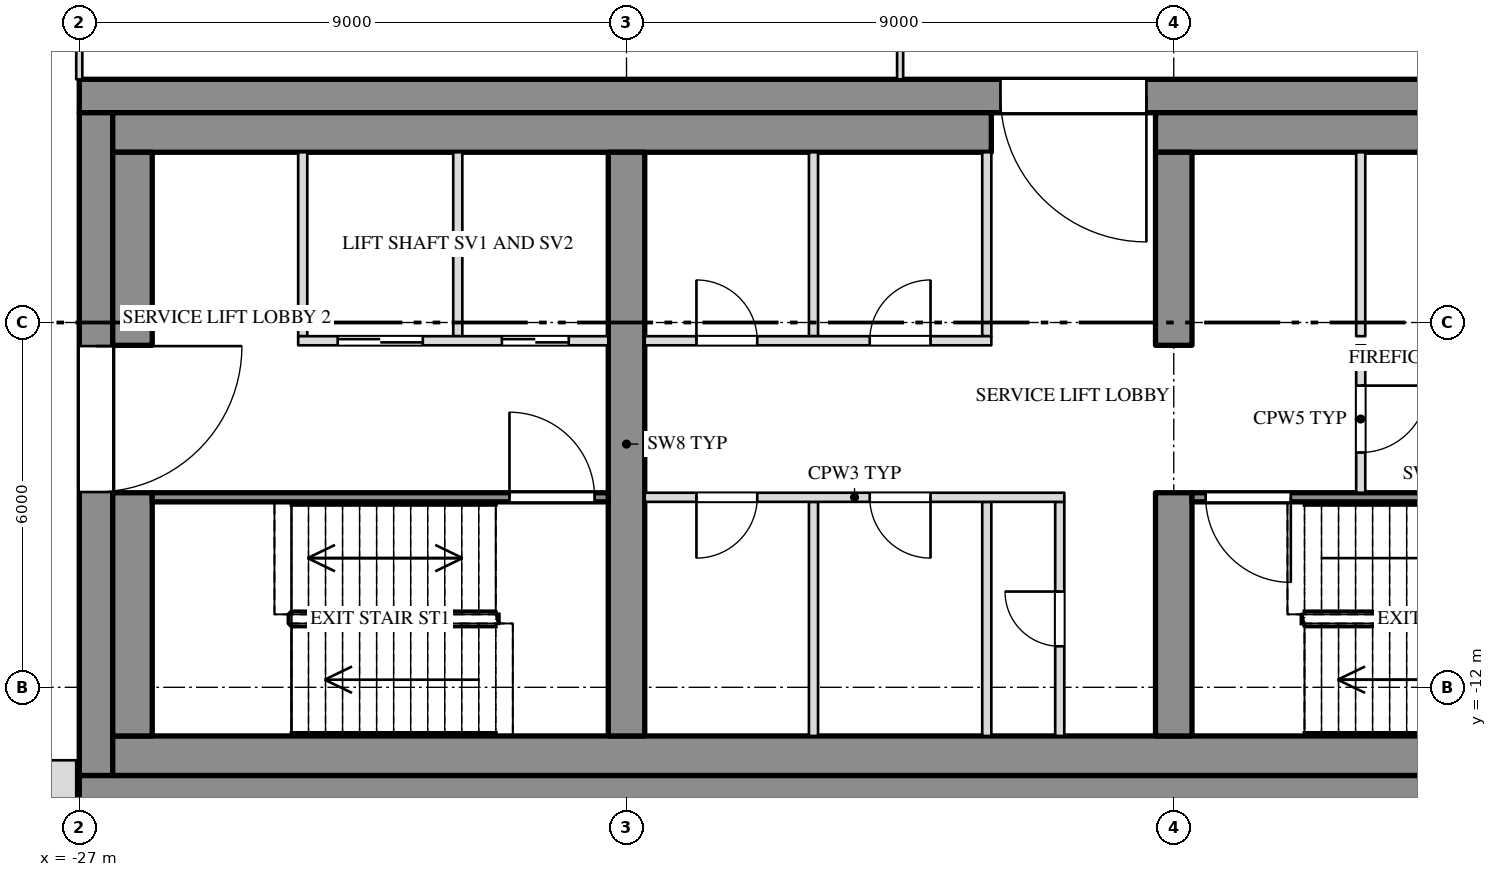
"""IFC4 building model, lengths in metres.
Left out: names, types, materials, properties, quantities, classifications, styles, units other than length and angle.
Written with IfcOpenShell. Run it as: python <this file> out.ifc"""

import sys

from ifc_helpers import new_model, si_unit, direction, frame, frame_2d, origin, place, context, subcontext, project, spatial, rectangle, extrude, element, fill, save


model = new_model("IFC4")
c1 = context("Model", 3, precision=1e-05, world=origin(), true_north=direction((0.0, 1.0)))
c2 = subcontext(c1, "Body", "Model", "MODEL_VIEW")
j1 = project(units=[si_unit("LENGTHUNIT", "METRE"), si_unit("PLANEANGLEUNIT", "RADIAN")], contexts=[c1])
p1 = place(None, origin())
s1 = spatial("IfcSite", under=j1, at=p1, CompositionType="ELEMENT")
p2 = place(p1, origin())
s2 = spatial("IfcBuilding", under=s1, at=p2, CompositionType="ELEMENT")
p3 = place(p2, frame((0.0, 0.0, 272.5)))
s3 = spatial("IfcBuildingStorey", under=s2, at=p3, CompositionType="ELEMENT", Elevation=272.5)
p4 = place(p3, frame((-27.0, -2.275, 0.0), z_axis=(0.0, 0.0, 1.0), x_axis=(1.0, 0.0, 0.0)))
e1 = element("IfcWall", 1, at=p4, inside=s3, PredefinedType="SHEAR", context=c2, shape_type="SweptSolid", body=[
    extrude(rectangle(XDim=54.0, YDim=0.55, at=frame_2d((27.0, 0.0))), origin(), (0.0, 0.0, 1.0), 3.78),
])
p5 = place(p4, frame((15.15, 0.0, 0.0)))
e2 = element("IfcOpeningElement", 2, at=p5, cuts=e1, PredefinedType="OPENING", context=c2, shape_type="SweptSolid", body=[
    extrude(rectangle(XDim=2.4, YDim=2.1, at=frame_2d((1.2, 1.05))), frame((0.0, 0.287, 0.0), z_axis=(0.0, -1.0, 0.0), x_axis=(1.0, 0.0, 0.0)), (0.0, 0.0, 1.0), 0.574),
])
p6 = place(p4, frame((36.45, 0.0, 0.0)))
e3 = element("IfcOpeningElement", 3, at=p6, cuts=e1, PredefinedType="OPENING", context=c2, shape_type="SweptSolid", body=[
    extrude(rectangle(XDim=2.4, YDim=2.1, at=frame_2d((1.2, 1.05))), frame((0.0, 0.287, 0.0), z_axis=(0.0, -1.0, 0.0), x_axis=(1.0, 0.0, 0.0)), (0.0, 0.0, 1.0), 0.574),
])
p7 = place(p3, frame((-27.0, -13.725, 0.0), z_axis=(0.0, 0.0, 1.0), x_axis=(1.0, 0.0, 0.0)))
e4 = element("IfcWall", 4, at=p7, inside=s3, PredefinedType="SHEAR", context=c2, shape_type="SweptSolid", body=[
    extrude(rectangle(XDim=54.0, YDim=0.55, at=frame_2d((27.0, 0.0))), origin(), (0.0, 0.0, 1.0), 3.78),
])
p8 = place(p3, frame((-26.725, -13.45, 0.0), z_axis=(0.0, 0.0, 1.0), x_axis=(0.0, 1.0, 0.0)))
e5 = element("IfcWall", 5, at=p8, inside=s3, PredefinedType="SHEAR", context=c2, shape_type="SweptSolid", body=[
    extrude(rectangle(XDim=10.9, YDim=0.55, at=frame_2d((5.45, 0.0))), origin(), (0.0, 0.0, 1.0), 3.78),
])
p9 = place(p8, frame((4.662, 0.0, 0.0)))
e6 = element("IfcOpeningElement", 6, at=p9, cuts=e5, PredefinedType="OPENING", context=c2, shape_type="SweptSolid", body=[
    extrude(rectangle(XDim=2.4, YDim=2.1, at=frame_2d((1.2, 1.05))), frame((0.0, 0.287, 0.0), z_axis=(0.0, -1.0, 0.0), x_axis=(1.0, 0.0, 0.0)), (0.0, 0.0, 1.0), 0.574),
])
p10 = place(p3, frame((-26.45, -2.875, 0.0), z_axis=(0.0, 0.0, 1.0), x_axis=(1.0, 0.0, 0.0)))
e7 = element("IfcWall", 7, at=p10, inside=s3, PredefinedType="SHEAR", context=c2, shape_type="SweptSolid", body=[
    extrude(rectangle(XDim=14.45, YDim=0.65, at=frame_2d((7.225, 0.0))), origin(), (0.0, 0.0, 1.0), 3.78),
])
p11 = place(p3, frame((-9.3, -2.875, 0.0), z_axis=(0.0, 0.0, 1.0), x_axis=(1.0, 0.0, 0.0)))
e8 = element("IfcWall", 8, at=p11, inside=s3, PredefinedType="SHEAR", context=c2, shape_type="SweptSolid", body=[
    extrude(rectangle(XDim=18.6, YDim=0.65, at=frame_2d((9.3, 0.0))), origin(), (0.0, 0.0, 1.0), 3.78),
])
p12 = place(p3, frame((-26.45, -13.125, 0.0), z_axis=(0.0, 0.0, 1.0), x_axis=(1.0, 0.0, 0.0)))
e9 = element("IfcWall", 9, at=p12, inside=s3, PredefinedType="SHEAR", context=c2, shape_type="SweptSolid", body=[
    extrude(rectangle(XDim=52.9, YDim=0.65, at=frame_2d((26.45, 0.0))), origin(), (0.0, 0.0, 1.0), 3.78),
])
p13 = place(p3, frame((-26.125, -12.8, 0.0), z_axis=(0.0, 0.0, 1.0), x_axis=(0.0, 1.0, 0.0)))
e10 = element("IfcWall", 10, at=p13, inside=s3, PredefinedType="SHEAR", context=c2, shape_type="SweptSolid", body=[
    extrude(rectangle(XDim=4.0, YDim=0.65, at=frame_2d((2.0, 0.0))), origin(), (0.0, 0.0, 1.0), 3.78),
])
p14 = place(p3, frame((-26.125, -6.375, 0.0), z_axis=(0.0, 0.0, 1.0), x_axis=(0.0, 1.0, 0.0)))
e11 = element("IfcWall", 11, at=p14, inside=s3, PredefinedType="SHEAR", context=c2, shape_type="SweptSolid", body=[
    extrude(rectangle(XDim=3.175, YDim=0.65, at=frame_2d((1.587, 0.0))), origin(), (0.0, 0.0, 1.0), 3.78),
])
p15 = place(p3, frame((-18.0, -12.8, 0.0), z_axis=(0.0, 0.0, 1.0), x_axis=(0.0, 1.0, 0.0)))
e12 = element("IfcWall", 12, at=p15, inside=s3, PredefinedType="SHEAR", context=c2, shape_type="SweptSolid", body=[
    extrude(rectangle(XDim=9.6, YDim=0.6, at=frame_2d((4.8, 0.0))), origin(), (0.0, 0.0, 1.0), 3.78),
])
p16 = place(p3, frame((-9.0, -12.8, 0.0), z_axis=(0.0, 0.0, 1.0), x_axis=(0.0, 1.0, 0.0)))
e13 = element("IfcWall", 13, at=p16, inside=s3, PredefinedType="SHEAR", context=c2, shape_type="SweptSolid", body=[
    extrude(rectangle(XDim=4.0, YDim=0.6, at=frame_2d((2.0, 0.0))), origin(), (0.0, 0.0, 1.0), 3.78),
])
p17 = place(p3, frame((-9.0, -6.375, 0.0), z_axis=(0.0, 0.0, 1.0), x_axis=(0.0, 1.0, 0.0)))
e14 = element("IfcWall", 14, at=p17, inside=s3, PredefinedType="SHEAR", context=c2, shape_type="SweptSolid", body=[
    extrude(rectangle(XDim=3.175, YDim=0.6, at=frame_2d((1.587, 0.0))), origin(), (0.0, 0.0, 1.0), 3.78),
])
p18 = place(p3, frame((-27.0, -2.0, 0.0), z_axis=(0.0, 0.0, 1.0), x_axis=(0.0, 1.0, 0.0)))
e15 = element("IfcWall", 15, at=p18, inside=s3, PredefinedType="PARTITIONING", context=c2, shape_type="SweptSolid", body=[
    extrude(rectangle(XDim=6.313, YDim=0.1, at=frame_2d((3.157, 0.0))), origin(), (0.0, 0.0, 1.0), 3.247),
])
p19 = place(p3, frame((-13.5, -2.0, 0.0), z_axis=(0.0, 0.0, 1.0), x_axis=(0.0, 1.0, 0.0)))
e16 = element("IfcWall", 16, at=p19, inside=s3, PredefinedType="PARTITIONING", context=c2, shape_type="SweptSolid", body=[
    extrude(rectangle(XDim=8.58, YDim=0.1, at=frame_2d((4.29, 0.0))), origin(), (0.0, 0.0, 1.0), 3.247),
])
p20 = place(p3, frame((-29.948, -13.6, 0.0), z_axis=(0.0, 0.0, 1.0), x_axis=(1.0, 0.0, 0.0)))
e17 = element("IfcWall", 17, at=p20, inside=s3, PredefinedType="SOLIDWALL", context=c2, shape_type="SweptSolid", body=[
    extrude(rectangle(XDim=2.897, YDim=0.8, at=frame_2d((1.449, 0.0))), origin(), (0.0, 0.0, 1.0), 3.78),
])
for number, where, z_axis, x_axis in (
    (18, (-20.775, -6.225, 0.0), (0.0, 0.0, 1.0), (0.0, 1.0, 0.0)),
    (19, (-23.325, -6.225, 0.0), (0.0, 0.0, 1.0), (0.0, 1.0, 0.0)),
    (20, (-12.075, -6.225, 0.0), (0.0, 0.0, 1.0), (0.0, 1.0, 0.0)),
    (21, (-14.925, -6.225, 0.0), (0.0, 0.0, 1.0), (0.0, 1.0, 0.0)),
    (22, (-5.925, -6.225, 0.0), (0.0, 0.0, 1.0), (0.0, 1.0, 0.0)),
):
    element("IfcWall", number, at=place(p3, frame(where, z_axis=z_axis, x_axis=x_axis)), inside=s3, PredefinedType="PARTITIONING", context=c2, shape_type="SweptSolid", body=[
        extrude(rectangle(XDim=3.025, YDim=0.15, at=frame_2d((1.513, 0.0))), origin(), (0.0, 0.0, 1.0), 3.78),
    ])
p21 = place(p3, frame((-10.875, -12.8, 0.0), z_axis=(0.0, 0.0, 1.0), x_axis=(0.0, 1.0, 0.0)))
e23 = element("IfcWall", 23, at=p21, inside=s3, PredefinedType="PARTITIONING", context=c2, shape_type="SweptSolid", body=[
    extrude(rectangle(XDim=3.85, YDim=0.15, at=frame_2d((1.925, 0.0))), origin(), (0.0, 0.0, 1.0), 3.78),
])
p22 = place(p21, frame((1.475, 0.0, 0.0)))
e24 = element("IfcOpeningElement", 24, at=p22, cuts=e23, PredefinedType="OPENING", context=c2, shape_type="SweptSolid", body=[
    extrude(rectangle(XDim=0.9, YDim=2.1, at=frame_2d((0.45, 1.05))), frame((0.0, 0.087, 0.0), z_axis=(0.0, -1.0, 0.0), x_axis=(1.0, 0.0, 0.0)), (0.0, 0.0, 1.0), 0.174),
])
for number, where, z_axis, x_axis in (
    (25, (-12.075, -12.8, 0.0), (0.0, 0.0, 1.0), (0.0, 1.0, 0.0)),
    (26, (-14.925, -12.8, 0.0), (0.0, 0.0, 1.0), (0.0, 1.0, 0.0)),
):
    element("IfcWall", number, at=place(p3, frame(where, z_axis=z_axis, x_axis=x_axis)), inside=s3, PredefinedType="PARTITIONING", context=c2, shape_type="SweptSolid", body=[
        extrude(rectangle(XDim=3.85, YDim=0.15, at=frame_2d((1.925, 0.0))), origin(), (0.0, 0.0, 1.0), 3.78),
    ])
p23 = place(p3, frame((-5.925, -8.8, 0.0), z_axis=(0.0, 0.0, 1.0), x_axis=(0.0, 1.0, 0.0)))
e27 = element("IfcWall", 27, at=p23, inside=s3, PredefinedType="PARTITIONING", context=c2, shape_type="SweptSolid", body=[
    extrude(rectangle(XDim=2.425, YDim=0.15, at=frame_2d((1.212, 0.0))), origin(), (0.0, 0.0, 1.0), 3.78),
])
p24 = place(p23, frame((0.662, 0.0, 0.0)))
e28 = element("IfcOpeningElement", 28, at=p24, cuts=e27, PredefinedType="OPENING", context=c2, shape_type="SweptSolid", body=[
    extrude(rectangle(XDim=1.1, YDim=2.1, at=frame_2d((0.55, 1.05))), frame((0.0, 0.087, 0.0), z_axis=(0.0, -1.0, 0.0), x_axis=(1.0, 0.0, 0.0)), (0.0, 0.0, 1.0), 0.174),
])
p25 = place(p3, frame((-23.4, -6.3, 0.0), z_axis=(0.0, 0.0, 1.0), x_axis=(1.0, 0.0, 0.0)))
e29 = element("IfcWall", 29, at=p25, inside=s3, PredefinedType="PARTITIONING", context=c2, shape_type="SweptSolid", body=[
    extrude(rectangle(XDim=5.1, YDim=0.15, at=frame_2d((2.55, 0.0))), origin(), (0.0, 0.0, 1.0), 3.78),
])
p26 = place(p25, frame((0.65, 0.0, 0.0)))
e30 = element("IfcOpeningElement", 30, at=p26, cuts=e29, PredefinedType="OPENING", context=c2, shape_type="SweptSolid", body=[
    extrude(rectangle(XDim=1.4, YDim=2.1, at=frame_2d((0.7, 1.05))), frame((0.0, 0.087, 0.0), z_axis=(0.0, -1.0, 0.0), x_axis=(1.0, 0.0, 0.0)), (0.0, 0.0, 1.0), 0.174),
])
p27 = place(p25, frame((3.35, 0.0, 0.0)))
e31 = element("IfcOpeningElement", 31, at=p27, cuts=e29, PredefinedType="OPENING", context=c2, shape_type="SweptSolid", body=[
    extrude(rectangle(XDim=1.1, YDim=2.1, at=frame_2d((0.55, 1.05))), frame((0.0, 0.087, 0.0), z_axis=(0.0, -1.0, 0.0), x_axis=(1.0, 0.0, 0.0)), (0.0, 0.0, 1.0), 0.174),
])
p28 = place(p3, frame((-17.7, -6.3, 0.0), z_axis=(0.0, 0.0, 1.0), x_axis=(1.0, 0.0, 0.0)))
e32 = element("IfcWall", 32, at=p28, inside=s3, PredefinedType="PARTITIONING", context=c2, shape_type="SweptSolid", body=[
    extrude(rectangle(XDim=5.7, YDim=0.15, at=frame_2d((2.85, 0.0))), origin(), (0.0, 0.0, 1.0), 3.78),
])
p29 = place(p28, frame((0.85, 0.0, 0.0)))
e33 = element("IfcOpeningElement", 33, at=p29, cuts=e32, PredefinedType="OPENING", context=c2, shape_type="SweptSolid", body=[
    extrude(rectangle(XDim=1.0, YDim=2.1, at=frame_2d((0.5, 1.05))), frame((0.0, 0.087, 0.0), z_axis=(0.0, -1.0, 0.0), x_axis=(1.0, 0.0, 0.0)), (0.0, 0.0, 1.0), 0.174),
])
p30 = place(p28, frame((3.7, 0.0, 0.0)))
e34 = element("IfcOpeningElement", 34, at=p30, cuts=e32, PredefinedType="OPENING", context=c2, shape_type="SweptSolid", body=[
    extrude(rectangle(XDim=1.0, YDim=2.1, at=frame_2d((0.5, 1.05))), frame((0.0, 0.087, 0.0), z_axis=(0.0, -1.0, 0.0), x_axis=(1.0, 0.0, 0.0)), (0.0, 0.0, 1.0), 0.174),
])
p31 = place(p3, frame((-25.8, -8.875, 0.0), z_axis=(0.0, 0.0, 1.0), x_axis=(1.0, 0.0, 0.0)))
e35 = element("IfcWall", 35, at=p31, inside=s3, PredefinedType="SHEAR", context=c2, shape_type="SweptSolid", body=[
    extrude(rectangle(XDim=7.5, YDim=0.15, at=frame_2d((3.75, 0.0))), origin(), (0.0, 0.0, 1.0), 3.78),
])
p32 = place(p31, frame((5.875, 0.0, 0.0)))
e36 = element("IfcOpeningElement", 36, at=p32, cuts=e35, PredefinedType="OPENING", context=c2, shape_type="SweptSolid", body=[
    extrude(rectangle(XDim=1.4, YDim=2.1, at=frame_2d((0.7, 1.05))), frame((0.0, 0.087, 0.0), z_axis=(0.0, -1.0, 0.0), x_axis=(1.0, 0.0, 0.0)), (0.0, 0.0, 1.0), 0.174),
])
p33 = place(p3, frame((-17.7, -8.875, 0.0), z_axis=(0.0, 0.0, 1.0), x_axis=(1.0, 0.0, 0.0)))
e37 = element("IfcWall", 37, at=p33, inside=s3, PredefinedType="PARTITIONING", context=c2, shape_type="SweptSolid", body=[
    extrude(rectangle(XDim=6.9, YDim=0.15, at=frame_2d((3.45, 0.0))), origin(), (0.0, 0.0, 1.0), 3.78),
])
p34 = place(p33, frame((0.85, 0.0, 0.0)))
e38 = element("IfcOpeningElement", 38, at=p34, cuts=e37, PredefinedType="OPENING", context=c2, shape_type="SweptSolid", body=[
    extrude(rectangle(XDim=1.0, YDim=2.1, at=frame_2d((0.5, 1.05))), frame((0.0, 0.087, 0.0), z_axis=(0.0, -1.0, 0.0), x_axis=(1.0, 0.0, 0.0)), (0.0, 0.0, 1.0), 0.174),
])
p35 = place(p33, frame((3.7, 0.0, 0.0)))
e39 = element("IfcOpeningElement", 39, at=p35, cuts=e37, PredefinedType="OPENING", context=c2, shape_type="SweptSolid", body=[
    extrude(rectangle(XDim=1.0, YDim=2.1, at=frame_2d((0.5, 1.05))), frame((0.0, 0.087, 0.0), z_axis=(0.0, -1.0, 0.0), x_axis=(1.0, 0.0, 0.0)), (0.0, 0.0, 1.0), 0.174),
])
p36 = place(p3, frame((-8.7, -8.875, 0.0), z_axis=(0.0, 0.0, 1.0), x_axis=(1.0, 0.0, 0.0)))
e40 = element("IfcWall", 40, at=p36, inside=s3, PredefinedType="SHEAR", context=c2, shape_type="SweptSolid", body=[
    extrude(rectangle(XDim=8.4, YDim=0.15, at=frame_2d((4.2, 0.0))), origin(), (0.0, 0.0, 1.0), 3.78),
])
p37 = place(p36, frame((0.225, 0.0, 0.0)))
e41 = element("IfcOpeningElement", 41, at=p37, cuts=e40, PredefinedType="OPENING", context=c2, shape_type="SweptSolid", body=[
    extrude(rectangle(XDim=1.4, YDim=2.1, at=frame_2d((0.7, 1.05))), frame((0.0, 0.087, 0.0), z_axis=(0.0, -1.0, 0.0), x_axis=(1.0, 0.0, 0.0)), (0.0, 0.0, 1.0), 0.174),
])
p38 = place(p9, origin())
e42 = element("IfcDoor", 42, at=p38, inside=s3, OperationType="DOUBLE_DOOR_SINGLE_SWING", PredefinedType="DOOR", context=c2, shape_type="SweptSolid", body=[
    extrude(rectangle(XDim=2.4, YDim=2.1, at=frame_2d((1.2, 1.05))), frame((0.0, 0.025, 0.0), z_axis=(0.0, -1.0, 0.0), x_axis=(1.0, 0.0, 0.0)), (0.0, 0.0, 1.0), 0.05),
])
fill(e6, e42)
p39 = place(p26, origin())
e43 = element("IfcDoor", 43, at=p39, inside=s3, OperationType="SLIDING_TO_RIGHT", PredefinedType="DOOR", context=c2, shape_type="SweptSolid", body=[
    extrude(rectangle(XDim=1.4, YDim=2.1, at=frame_2d((0.7, 1.05))), frame((0.0, 0.025, 0.0), z_axis=(0.0, -1.0, 0.0), x_axis=(1.0, 0.0, 0.0)), (0.0, 0.0, 1.0), 0.05),
])
fill(e30, e43)
p40 = place(p27, origin())
e44 = element("IfcDoor", 44, at=p40, inside=s3, OperationType="SLIDING_TO_LEFT", PredefinedType="DOOR", context=c2, shape_type="SweptSolid", body=[
    extrude(rectangle(XDim=1.1, YDim=2.1, at=frame_2d((0.55, 1.05))), frame((0.0, 0.025, 0.0), z_axis=(0.0, -1.0, 0.0), x_axis=(1.0, 0.0, 0.0)), (0.0, 0.0, 1.0), 0.05),
])
fill(e31, e44)
p41 = place(p32, origin())
e45 = element("IfcDoor", 45, at=p41, inside=s3, OperationType="DOUBLE_DOOR_SINGLE_SWING", PredefinedType="DOOR", context=c2, shape_type="SweptSolid", body=[
    extrude(rectangle(XDim=1.4, YDim=2.1, at=frame_2d((0.7, 1.05))), frame((0.0, 0.025, 0.0), z_axis=(0.0, -1.0, 0.0), x_axis=(1.0, 0.0, 0.0)), (0.0, 0.0, 1.0), 0.05),
])
fill(e36, e45)
p42 = place(p34, origin())
e46 = element("IfcDoor", 46, at=p42, inside=s3, OperationType="SINGLE_SWING_RIGHT", PredefinedType="DOOR", context=c2, shape_type="SweptSolid", body=[
    extrude(rectangle(XDim=1.0, YDim=2.1, at=frame_2d((0.5, 1.05))), frame((0.0, 0.025, 0.0), z_axis=(0.0, -1.0, 0.0), x_axis=(1.0, 0.0, 0.0)), (0.0, 0.0, 1.0), 0.05),
])
fill(e38, e46)
p43 = place(p29, origin())
e47 = element("IfcDoor", 47, at=p43, inside=s3, OperationType="SINGLE_SWING_LEFT", PredefinedType="DOOR", context=c2, shape_type="SweptSolid", body=[
    extrude(rectangle(XDim=1.0, YDim=2.1, at=frame_2d((0.5, 1.05))), frame((0.0, 0.025, 0.0), z_axis=(0.0, -1.0, 0.0), x_axis=(1.0, 0.0, 0.0)), (0.0, 0.0, 1.0), 0.05),
])
fill(e33, e47)
p44 = place(p35, origin())
e48 = element("IfcDoor", 48, at=p44, inside=s3, OperationType="SINGLE_SWING_LEFT", PredefinedType="DOOR", context=c2, shape_type="SweptSolid", body=[
    extrude(rectangle(XDim=1.0, YDim=2.1, at=frame_2d((0.5, 1.05))), frame((0.0, 0.025, 0.0), z_axis=(0.0, -1.0, 0.0), x_axis=(1.0, 0.0, 0.0)), (0.0, 0.0, 1.0), 0.05),
])
fill(e39, e48)
p45 = place(p30, origin())
e49 = element("IfcDoor", 49, at=p45, inside=s3, OperationType="SINGLE_SWING_RIGHT", PredefinedType="DOOR", context=c2, shape_type="SweptSolid", body=[
    extrude(rectangle(XDim=1.0, YDim=2.1, at=frame_2d((0.5, 1.05))), frame((0.0, 0.025, 0.0), z_axis=(0.0, -1.0, 0.0), x_axis=(1.0, 0.0, 0.0)), (0.0, 0.0, 1.0), 0.05),
])
fill(e34, e49)
p46 = place(p22, origin())
e50 = element("IfcDoor", 50, at=p46, inside=s3, OperationType="SINGLE_SWING_RIGHT", PredefinedType="DOOR", context=c2, shape_type="SweptSolid", body=[
    extrude(rectangle(XDim=0.9, YDim=2.1, at=frame_2d((0.45, 1.05))), frame((0.0, 0.025, 0.0), z_axis=(0.0, -1.0, 0.0), x_axis=(1.0, 0.0, 0.0)), (0.0, 0.0, 1.0), 0.05),
])
fill(e24, e50)
p47 = place(p5, origin())
e51 = element("IfcDoor", 51, at=p47, inside=s3, OperationType="DOUBLE_DOOR_SINGLE_SWING", PredefinedType="DOOR", context=c2, shape_type="SweptSolid", body=[
    extrude(rectangle(XDim=2.4, YDim=2.1, at=frame_2d((1.2, 1.05))), frame((0.0, 0.025, 0.0), z_axis=(0.0, -1.0, 0.0), x_axis=(1.0, 0.0, 0.0)), (0.0, 0.0, 1.0), 0.05),
])
fill(e2, e51)
p48 = place(p37, origin())
e52 = element("IfcDoor", 52, at=p48, inside=s3, OperationType="DOUBLE_DOOR_SINGLE_SWING", PredefinedType="DOOR", context=c2, shape_type="SweptSolid", body=[
    extrude(rectangle(XDim=1.4, YDim=2.1, at=frame_2d((0.7, 1.05))), frame((0.0, 0.025, 0.0), z_axis=(0.0, -1.0, 0.0), x_axis=(1.0, 0.0, 0.0)), (0.0, 0.0, 1.0), 0.05),
])
fill(e41, e52)
p49 = place(p24, origin())
e53 = element("IfcDoor", 53, at=p49, inside=s3, OperationType="SINGLE_SWING_LEFT", PredefinedType="DOOR", context=c2, shape_type="SweptSolid", body=[
    extrude(rectangle(XDim=1.1, YDim=2.1, at=frame_2d((0.55, 1.05))), frame((0.0, 0.025, 0.0), z_axis=(0.0, -1.0, 0.0), x_axis=(1.0, 0.0, 0.0)), (0.0, 0.0, 1.0), 0.05),
])
fill(e28, e53)
save(model, sys.argv[1])
